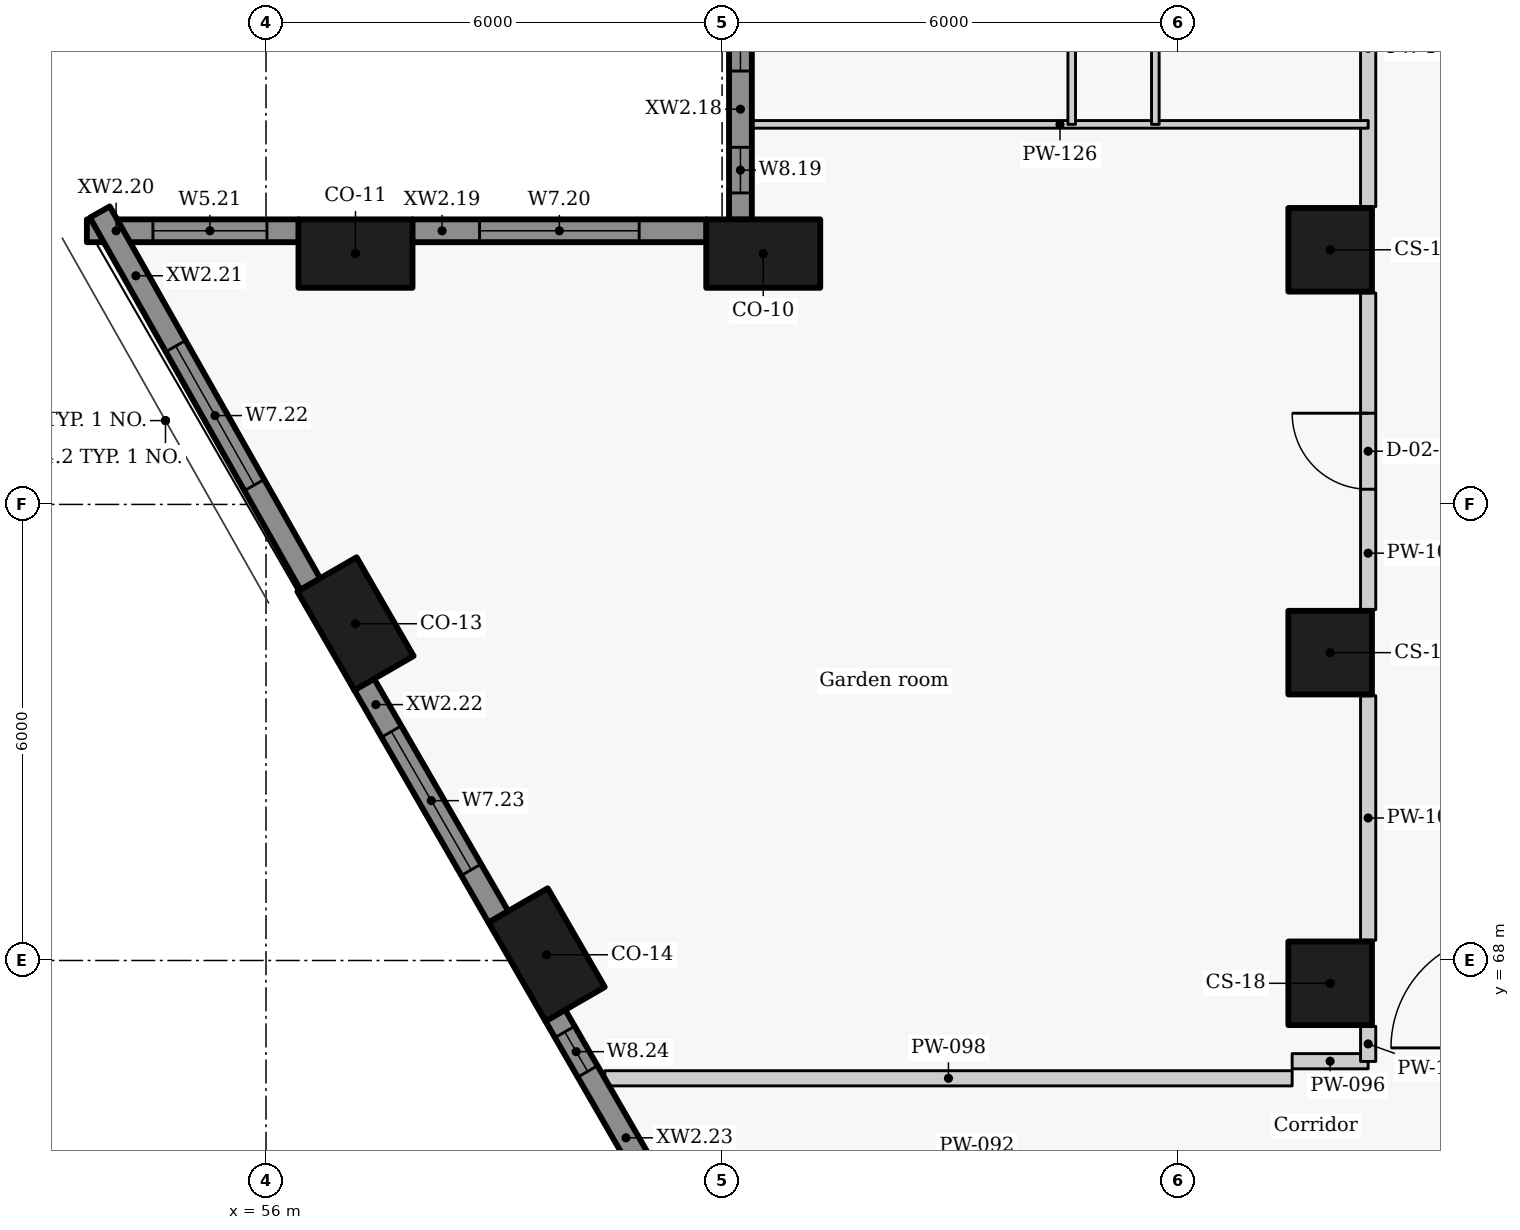
"""IFC4 building model, lengths in metres.
Left out: names, types, materials, properties, quantities, classifications, styles, units other than length and angle.
Written with IfcOpenShell. Run it as: python <this file> out.ifc"""

import sys

from ifc_helpers import new_model, si_unit, direction, frame, frame_2d, origin, origin_2d, place, context, subcontext, project, spatial, rectangle, extrude, element, fill, save


model = new_model("IFC4")
c1 = context("Model", 3, precision=1e-05, world=origin(), true_north=direction((0.0, 1.0)))
c2 = subcontext(c1, "Body", "Model", "MODEL_VIEW")
j1 = project(units=[si_unit("LENGTHUNIT", "METRE"), si_unit("PLANEANGLEUNIT", "RADIAN")], contexts=[c1])
p1 = place(None, origin())
s1 = spatial("IfcSite", under=j1, at=p1, CompositionType="ELEMENT")
p2 = place(p1, origin())
s2 = spatial("IfcBuilding", under=s1, at=p2, CompositionType="ELEMENT")
p3 = place(p2, frame((0.0, 0.0, 61.2)))
s3 = spatial("IfcBuildingStorey", under=s2, at=p3, CompositionType="ELEMENT", Elevation=61.2)
for number, where, z_axis, x_axis in (
    (1, (62.542, 77.3, 0.0), (0.0, 0.0, 1.0), (-1.0, 0.0, 0.0)),
    (2, (57.177, 77.3, 0.0), (0.0, 0.0, 1.0), (-1.0, 0.0, 0.0)),
    (3, (57.177, 72.43, 0.0), (0.0, 0.0, 1.0), (0.5, -0.866, 0.0)),
    (4, (59.692, 68.075, 0.0), (0.0, 0.0, 1.0), (0.5, -0.866, 0.0)),
):
    element("IfcColumn", number, at=place(p3, frame(where, z_axis=z_axis, x_axis=x_axis)), inside=s3, PredefinedType="COLUMN", context=c2, shape_type="SweptSolid", body=[
        extrude(rectangle(XDim=1.5, YDim=0.9, at=origin_2d()), origin(), (0.0, 0.0, 1.0), 3.3),
    ])
for number, where, z_axis, x_axis in (
    (5, (70.0, 77.35, 0.0), (0.0, 0.0, 1.0), (0.0, -1.0, 0.0)),
    (6, (70.0, 72.05, 0.0), (0.0, 0.0, 1.0), (0.0, -1.0, 0.0)),
    (7, (70.0, 67.7, 0.0), (0.0, 0.0, 1.0), (0.0, -1.0, 0.0)),
):
    element("IfcColumn", number, at=place(p3, frame(where, z_axis=z_axis, x_axis=x_axis)), inside=s3, PredefinedType="COLUMN", context=c2, shape_type="SweptSolid", body=[
        extrude(rectangle(XDim=1.1, YDim=1.1, at=origin_2d()), origin(), (0.0, 0.0, 1.0), 3.3),
    ])
p4 = place(p3, frame((62.242, 81.954, 0.0), z_axis=(0.0, 0.0, 1.0), x_axis=(0.0, -1.0, 0.0)))
e8 = element("IfcWall", 8, at=p4, inside=s3, PredefinedType="SOLIDWALL", context=c2, shape_type="SweptSolid", body=[
    extrude(rectangle(XDim=4.208, YDim=0.3, at=frame_2d((2.104, 0.0))), origin(), (0.0, 0.0, 1.0), 2.425),
])
p5 = place(p4, frame((0.752, 0.0, 0.9)))
e9 = element("IfcOpeningElement", 9, at=p5, cuts=e8, PredefinedType="OPENING", context=c2, shape_type="SweptSolid", body=[
    extrude(rectangle(XDim=1.5, YDim=1.1, at=frame_2d((0.75, 0.55))), frame((0.0, 0.16, 0.0), z_axis=(0.0, -1.0, 0.0), x_axis=(1.0, 0.0, 0.0)), (0.0, 0.0, 1.0), 0.32),
])
p6 = place(p4, frame((3.256, 0.0, 0.9)))
e10 = element("IfcOpeningElement", 10, at=p6, cuts=e8, PredefinedType="OPENING", context=c2, shape_type="SweptSolid", body=[
    extrude(rectangle(XDim=0.6, YDim=1.1, at=frame_2d((0.3, 0.55))), frame((0.0, 0.16, 0.0), z_axis=(0.0, -1.0, 0.0), x_axis=(1.0, 0.0, 0.0)), (0.0, 0.0, 1.0), 0.32),
])
p7 = place(p3, frame((61.796, 77.6, 0.0), z_axis=(0.0, 0.0, 1.0), x_axis=(-1.0, 0.0, 0.0)))
e11 = element("IfcWall", 11, at=p7, inside=s3, PredefinedType="SOLIDWALL", context=c2, shape_type="SweptSolid", body=[
    extrude(rectangle(XDim=3.873, YDim=0.3, at=frame_2d((1.936, 0.0))), origin(), (0.0, 0.0, 1.0), 2.425),
])
p8 = place(p7, frame((0.886, 0.0, 0.9)))
e12 = element("IfcOpeningElement", 12, at=p8, cuts=e11, PredefinedType="OPENING", context=c2, shape_type="SweptSolid", body=[
    extrude(rectangle(XDim=2.1, YDim=1.1, at=frame_2d((1.05, 0.55))), frame((0.0, 0.16, 0.0), z_axis=(0.0, -1.0, 0.0), x_axis=(1.0, 0.0, 0.0)), (0.0, 0.0, 1.0), 0.32),
])
p9 = place(p3, frame((56.431, 77.6, 0.0), z_axis=(0.0, 0.0, 1.0), x_axis=(-1.0, 0.0, 0.0)))
e13 = element("IfcWall", 13, at=p9, inside=s3, PredefinedType="SOLIDWALL", context=c2, shape_type="SweptSolid", body=[
    extrude(rectangle(XDim=2.788, YDim=0.3, at=frame_2d((1.394, 0.0))), origin(), (0.0, 0.0, 1.0), 2.425),
])
p10 = place(p9, frame((0.419, 0.0, 0.9)))
e14 = element("IfcOpeningElement", 14, at=p10, cuts=e13, PredefinedType="OPENING", context=c2, shape_type="SweptSolid", body=[
    extrude(rectangle(XDim=1.5, YDim=1.1, at=frame_2d((0.75, 0.55))), frame((0.0, 0.16, 0.0), z_axis=(0.0, -1.0, 0.0), x_axis=(1.0, 0.0, 0.0)), (0.0, 0.0, 1.0), 0.32),
])
p11 = place(p3, frame((53.814, 77.847, 0.0), z_axis=(0.0, 0.0, 1.0), x_axis=(0.492363204642, -0.870389840655, 0.0)))
e15 = element("IfcWall", 15, at=p11, inside=s3, PredefinedType="SOLIDWALL", context=c2, shape_type="SweptSolid", body=[
    extrude(rectangle(XDim=5.626, YDim=0.3, at=frame_2d((2.813, 0.0))), origin(), (0.0, 0.0, 1.0), 2.425),
])
p12 = place(p11, frame((2.026, 0.0, 0.9)))
e16 = element("IfcOpeningElement", 16, at=p12, cuts=e15, PredefinedType="OPENING", context=c2, shape_type="SweptSolid", body=[
    extrude(rectangle(XDim=2.1, YDim=1.1, at=frame_2d((1.05, 0.55))), frame((0.0, 0.16, 0.0), z_axis=(0.0, -1.0, 0.0), x_axis=(1.0, 0.0, 0.0)), (0.0, 0.0, 1.0), 0.32),
])
p13 = place(p3, frame((57.29, 71.634, 0.0), z_axis=(0.0, 0.0, 1.0), x_axis=(0.499977402622, -0.866038449993, 0.0)))
e17 = element("IfcWall", 17, at=p13, inside=s3, PredefinedType="SOLIDWALL", context=c2, shape_type="SweptSolid", body=[
    extrude(rectangle(XDim=3.537, YDim=0.3, at=frame_2d((1.769, 0.0))), origin(), (0.0, 0.0, 1.0), 2.425),
])
p14 = place(p13, frame((0.719, 0.0, 0.9)))
e18 = element("IfcOpeningElement", 18, at=p14, cuts=e17, PredefinedType="OPENING", context=c2, shape_type="SweptSolid", body=[
    extrude(rectangle(XDim=2.1, YDim=1.1, at=frame_2d((1.05, 0.55))), frame((0.0, 0.16, 0.0), z_axis=(0.0, -1.0, 0.0), x_axis=(1.0, 0.0, 0.0)), (0.0, 0.0, 1.0), 0.32),
])
p15 = place(p3, frame((59.805, 67.279, 0.0), z_axis=(0.0, 0.0, 1.0), x_axis=(0.500001735503, -0.866024401789, 0.0)))
e19 = element("IfcWall", 19, at=p15, inside=s3, PredefinedType="SOLIDWALL", context=c2, shape_type="SweptSolid", body=[
    extrude(rectangle(XDim=3.834, YDim=0.3, at=frame_2d((1.917, 0.0))), origin(), (0.0, 0.0, 1.0), 2.425),
])
p16 = place(p15, frame((0.253, 0.0, 0.9)))
e20 = element("IfcOpeningElement", 20, at=p16, cuts=e19, PredefinedType="OPENING", context=c2, shape_type="SweptSolid", body=[
    extrude(rectangle(XDim=0.6, YDim=1.1, at=frame_2d((0.3, 0.55))), frame((0.0, 0.16, 0.0), z_axis=(0.0, -1.0, 0.0), x_axis=(1.0, 0.0, 0.0)), (0.0, 0.0, 1.0), 0.32),
])
p17 = place(p15, frame((2.87, 0.0, 0.9)))
e21 = element("IfcOpeningElement", 21, at=p17, cuts=e19, PredefinedType="OPENING", context=c2, shape_type="SweptSolid", body=[
    extrude(rectangle(XDim=0.6, YDim=1.1, at=frame_2d((0.3, 0.55))), frame((0.0, 0.16, 0.0), z_axis=(0.0, -1.0, 0.0), x_axis=(1.0, 0.0, 0.0)), (0.0, 0.0, 1.0), 0.32),
])
p18 = place(p3, frame((69.5, 66.675, 0.0), z_axis=(0.0, 0.0, 1.0), x_axis=(1.0, 0.0, 0.0)))
e22 = element("IfcWall", 22, at=p18, inside=s3, PredefinedType="PARTITIONING", context=c2, shape_type="SweptSolid", body=[
    extrude(rectangle(XDim=1.0, YDim=0.2, at=frame_2d((0.5, 0.0))), origin(), (0.0, 0.0, 1.0), 2.505),
])
p19 = place(p3, frame((60.457, 66.45, 0.0), z_axis=(0.0, 0.0, 1.0), x_axis=(1.0, 0.0, 0.0)))
e23 = element("IfcWall", 23, at=p19, inside=s3, PredefinedType="PARTITIONING", context=c2, shape_type="SweptSolid", body=[
    extrude(rectangle(XDim=9.043, YDim=0.2, at=frame_2d((4.521, 0.0))), origin(), (0.0, 0.0, 1.0), 2.405),
])
p20 = place(p3, frame((70.5, 66.672, 0.0), z_axis=(0.0, 0.0, 1.0), x_axis=(0.0, 1.0, 0.0)))
e24 = element("IfcWall", 24, at=p20, inside=s3, PredefinedType="PARTITIONING", context=c2, shape_type="SweptSolid", body=[
    extrude(rectangle(XDim=0.461, YDim=0.2, at=frame_2d((0.23, 0.0))), origin(), (0.0, 0.0, 1.0), 3.025),
])
p21 = place(p3, frame((70.5, 68.267, 0.0), z_axis=(0.0, 0.0, 1.0), x_axis=(0.0, 1.0, 0.0)))
e25 = element("IfcWall", 25, at=p21, inside=s3, PredefinedType="PARTITIONING", context=c2, shape_type="SweptSolid", body=[
    extrude(rectangle(XDim=3.216, YDim=0.2, at=frame_2d((1.608, 0.0))), origin(), (0.0, 0.0, 1.0), 3.025),
])
p22 = place(p3, frame((70.5, 72.617, 0.0), z_axis=(0.0, 0.0, 1.0), x_axis=(0.0, 1.0, 0.0)))
e26 = element("IfcWall", 26, at=p22, inside=s3, PredefinedType="PARTITIONING", context=c2, shape_type="SweptSolid", body=[
    extrude(rectangle(XDim=4.166, YDim=0.2, at=frame_2d((2.083, 0.0))), origin(), (0.0, 0.0, 1.0), 3.025),
])
p23 = place(p22, frame((1.583, 0.0, 0.0)))
e27 = element("IfcOpeningElement", 27, at=p23, cuts=e26, PredefinedType="OPENING", context=c2, shape_type="SweptSolid", body=[
    extrude(rectangle(XDim=1.0, YDim=2.1, at=frame_2d((0.5, 1.05))), frame((0.0, 0.11, 0.0), z_axis=(0.0, -1.0, 0.0), x_axis=(1.0, 0.0, 0.0)), (0.0, 0.0, 1.0), 0.22),
])
p24 = place(p3, frame((70.5, 77.917, 0.0), z_axis=(0.0, 0.0, 1.0), x_axis=(0.0, 1.0, 0.0)))
e28 = element("IfcWall", 28, at=p24, inside=s3, PredefinedType="PARTITIONING", context=c2, shape_type="SweptSolid", body=[
    extrude(rectangle(XDim=4.166, YDim=0.2, at=frame_2d((2.083, 0.0))), origin(), (0.0, 0.0, 1.0), 3.025),
])
p25 = place(p3, frame((62.392, 79.0, 0.0), z_axis=(0.0, 0.0, 1.0), x_axis=(1.0, 0.0, 0.0)))
e29 = element("IfcWall", 29, at=p25, inside=s3, PredefinedType="PARTITIONING", context=c2, shape_type="SweptSolid", body=[
    extrude(rectangle(XDim=8.108, YDim=0.1, at=frame_2d((4.054, 0.0))), origin(), (0.0, 0.0, 1.0), 2.405),
])
p26 = place(p3, frame((67.7, 85.9, 0.0), z_axis=(0.0, 0.0, 1.0), x_axis=(0.0, -1.0, 0.0)))
e30 = element("IfcWall", 30, at=p26, inside=s3, PredefinedType="PARTITIONING", context=c2, shape_type="SweptSolid", body=[
    extrude(rectangle(XDim=6.9, YDim=0.1, at=frame_2d((3.45, 0.0))), origin(), (0.0, 0.0, 1.0), 3.025),
])
p27 = place(p26, frame((4.568, 0.0, 0.0)))
e31 = element("IfcOpeningElement", 31, at=p27, cuts=e30, PredefinedType="OPENING", context=c2, shape_type="SweptSolid", body=[
    extrude(rectangle(XDim=0.9, YDim=2.1, at=frame_2d((0.45, 1.05))), frame((0.0, 0.06, 0.0), z_axis=(0.0, -1.0, 0.0), x_axis=(1.0, 0.0, 0.0)), (0.0, 0.0, 1.0), 0.12),
])
p28 = place(p26, frame((1.143, 0.0, 0.0)))
e32 = element("IfcOpeningElement", 32, at=p28, cuts=e30, PredefinedType="OPENING", context=c2, shape_type="SweptSolid", body=[
    extrude(rectangle(XDim=0.85, YDim=2.1, at=frame_2d((0.425, 1.05))), frame((0.0, 0.06, 0.0), z_axis=(0.0, -1.0, 0.0), x_axis=(1.0, 0.0, 0.0)), (0.0, 0.0, 1.0), 0.12),
])
p29 = place(p3, frame((66.6, 79.0, 0.0), z_axis=(0.0, 0.0, 1.0), x_axis=(0.0, 1.0, 0.0)))
e33 = element("IfcWall", 33, at=p29, inside=s3, PredefinedType="PARTITIONING", context=c2, shape_type="SweptSolid", body=[
    extrude(rectangle(XDim=10.0, YDim=0.1, at=frame_2d((5.0, 0.0))), origin(), (0.0, 0.0, 1.0), 3.025),
])
p30 = place(p29, frame((1.002, 0.0, 0.0)))
e34 = element("IfcOpeningElement", 34, at=p30, cuts=e33, PredefinedType="OPENING", context=c2, shape_type="SweptSolid", body=[
    extrude(rectangle(XDim=0.9, YDim=2.1, at=frame_2d((0.45, 1.05))), frame((0.0, 0.06, 0.0), z_axis=(0.0, -1.0, 0.0), x_axis=(1.0, 0.0, 0.0)), (0.0, 0.0, 1.0), 0.12),
])
p31 = place(p29, frame((3.905, 0.0, 0.0)))
e35 = element("IfcOpeningElement", 35, at=p31, cuts=e33, PredefinedType="OPENING", context=c2, shape_type="SweptSolid", body=[
    extrude(rectangle(XDim=0.9, YDim=2.1, at=frame_2d((0.45, 1.05))), frame((0.0, 0.06, 0.0), z_axis=(0.0, -1.0, 0.0), x_axis=(1.0, 0.0, 0.0)), (0.0, 0.0, 1.0), 0.12),
])
p32 = place(p29, frame((7.453, 0.0, 0.0)))
e36 = element("IfcOpeningElement", 36, at=p32, cuts=e33, PredefinedType="OPENING", context=c2, shape_type="SweptSolid", body=[
    extrude(rectangle(XDim=0.9, YDim=2.1, at=frame_2d((0.45, 1.05))), frame((0.0, 0.06, 0.0), z_axis=(0.0, -1.0, 0.0), x_axis=(1.0, 0.0, 0.0)), (0.0, 0.0, 1.0), 0.12),
])
p33 = place(p5, origin())
e37 = element("IfcWindow", 37, at=p33, inside=s3, PartitioningType="SINGLE_PANEL", PredefinedType="WINDOW", context=c2, shape_type="SweptSolid", body=[
    extrude(rectangle(XDim=1.5, YDim=1.1, at=frame_2d((0.75, 0.55))), frame((0.0, 0.03, 0.0), z_axis=(0.0, -1.0, 0.0), x_axis=(1.0, 0.0, 0.0)), (0.0, 0.0, 1.0), 0.06),
])
fill(e9, e37)
p34 = place(p6, origin())
e38 = element("IfcWindow", 38, at=p34, inside=s3, PartitioningType="SINGLE_PANEL", PredefinedType="WINDOW", context=c2, shape_type="SweptSolid", body=[
    extrude(rectangle(XDim=0.6, YDim=1.1, at=frame_2d((0.3, 0.55))), frame((0.0, 0.03, 0.0), z_axis=(0.0, -1.0, 0.0), x_axis=(1.0, 0.0, 0.0)), (0.0, 0.0, 1.0), 0.06),
])
fill(e10, e38)
p35 = place(p8, origin())
e39 = element("IfcWindow", 39, at=p35, inside=s3, PartitioningType="SINGLE_PANEL", PredefinedType="WINDOW", context=c2, shape_type="SweptSolid", body=[
    extrude(rectangle(XDim=2.1, YDim=1.1, at=frame_2d((1.05, 0.55))), frame((0.0, 0.03, 0.0), z_axis=(0.0, -1.0, 0.0), x_axis=(1.0, 0.0, 0.0)), (0.0, 0.0, 1.0), 0.06),
])
fill(e12, e39)
p36 = place(p10, origin())
e40 = element("IfcWindow", 40, at=p36, inside=s3, PartitioningType="SINGLE_PANEL", PredefinedType="WINDOW", context=c2, shape_type="SweptSolid", body=[
    extrude(rectangle(XDim=1.5, YDim=1.1, at=frame_2d((0.75, 0.55))), frame((0.0, 0.03, 0.0), z_axis=(0.0, -1.0, 0.0), x_axis=(1.0, 0.0, 0.0)), (0.0, 0.0, 1.0), 0.06),
])
fill(e14, e40)
p37 = place(p12, origin())
e41 = element("IfcWindow", 41, at=p37, inside=s3, PartitioningType="SINGLE_PANEL", PredefinedType="WINDOW", context=c2, shape_type="SweptSolid", body=[
    extrude(rectangle(XDim=2.1, YDim=1.1, at=frame_2d((1.05, 0.55))), frame((0.0, 0.03, 0.0), z_axis=(0.0, -1.0, 0.0), x_axis=(1.0, 0.0, 0.0)), (0.0, 0.0, 1.0), 0.06),
])
fill(e16, e41)
p38 = place(p14, origin())
e42 = element("IfcWindow", 42, at=p38, inside=s3, PartitioningType="SINGLE_PANEL", PredefinedType="WINDOW", context=c2, shape_type="SweptSolid", body=[
    extrude(rectangle(XDim=2.1, YDim=1.1, at=frame_2d((1.05, 0.55))), frame((0.0, 0.03, 0.0), z_axis=(0.0, -1.0, 0.0), x_axis=(1.0, 0.0, 0.0)), (0.0, 0.0, 1.0), 0.06),
])
fill(e18, e42)
p39 = place(p16, origin())
e43 = element("IfcWindow", 43, at=p39, inside=s3, PartitioningType="SINGLE_PANEL", PredefinedType="WINDOW", context=c2, shape_type="SweptSolid", body=[
    extrude(rectangle(XDim=0.6, YDim=1.1, at=frame_2d((0.3, 0.55))), frame((0.0, 0.03, 0.0), z_axis=(0.0, -1.0, 0.0), x_axis=(1.0, 0.0, 0.0)), (0.0, 0.0, 1.0), 0.06),
])
fill(e20, e43)
p40 = place(p23, origin())
e44 = element("IfcDoor", 44, at=p40, inside=s3, OperationType="SINGLE_SWING_RIGHT", PredefinedType="DOOR", context=c2, shape_type="SweptSolid", body=[
    extrude(rectangle(XDim=1.0, YDim=2.1, at=frame_2d((0.5, 1.05))), frame((0.0, 0.025, 0.0), z_axis=(0.0, -1.0, 0.0), x_axis=(1.0, 0.0, 0.0)), (0.0, 0.0, 1.0), 0.05),
])
fill(e27, e44)
save(model, sys.argv[1])
